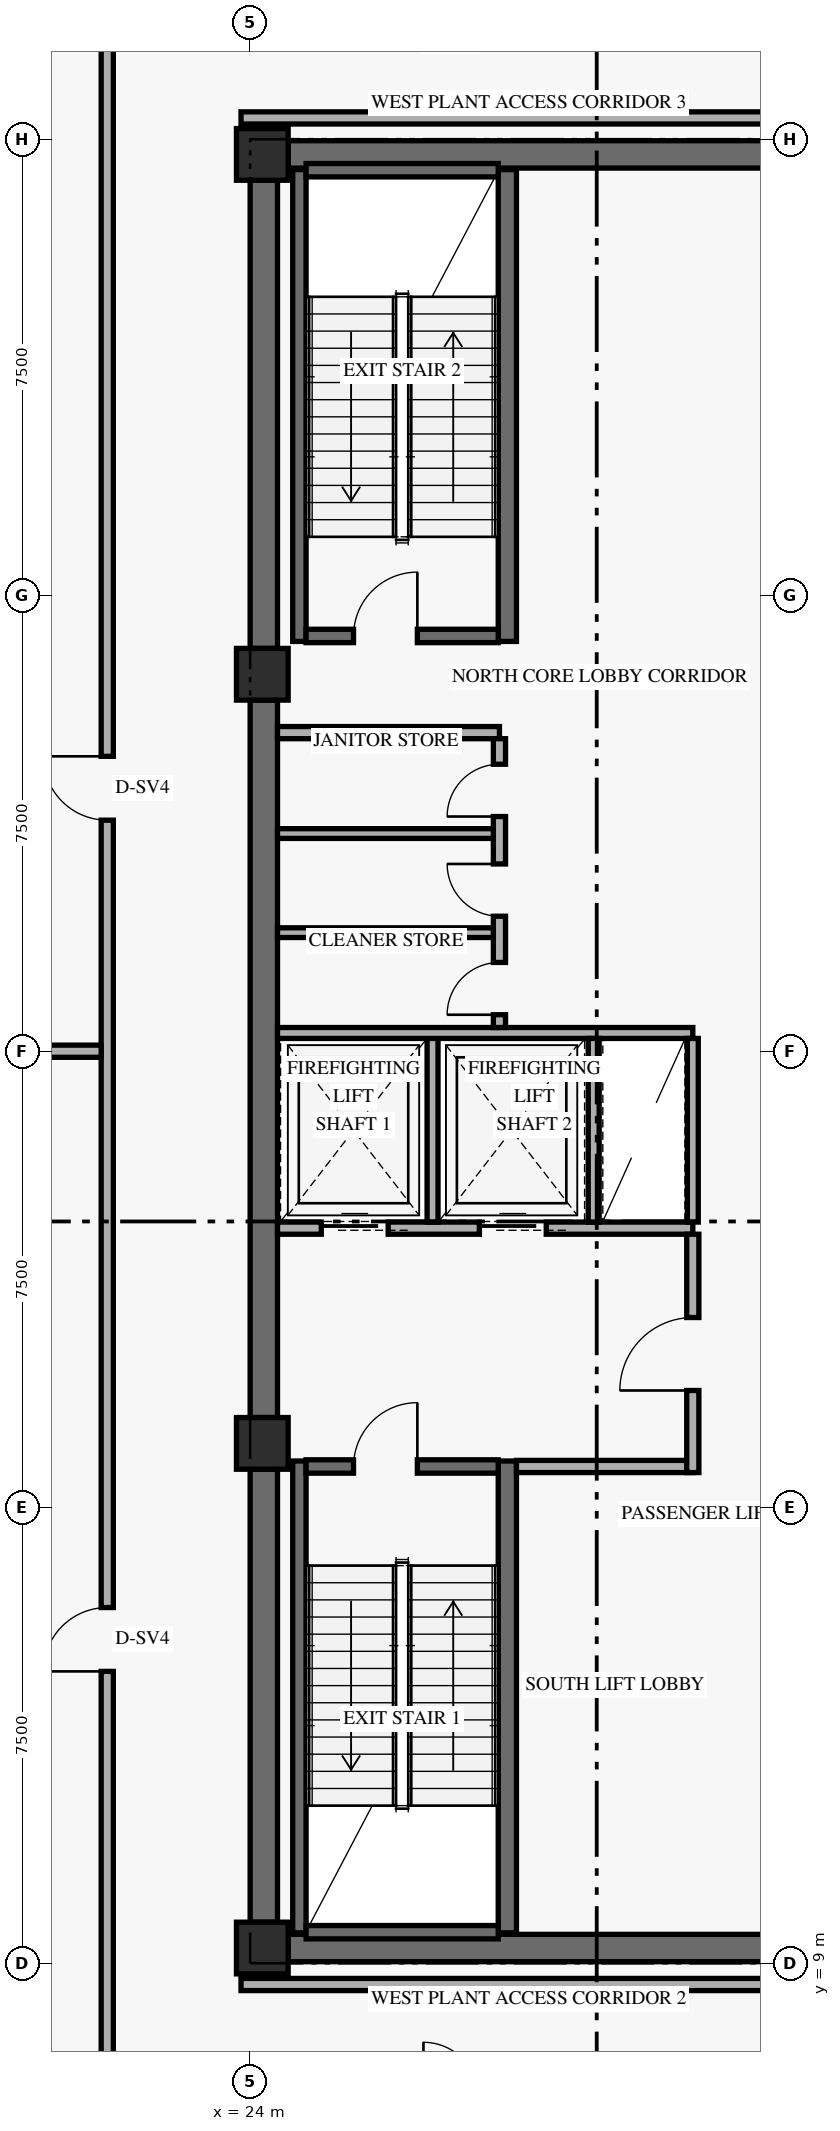
"""IFC4 building model, lengths in metres.
Left out: names, types, materials, properties, quantities, classifications, styles, units other than length and angle.
Written with IfcOpenShell. Run it as: python <this file> out.ifc"""

import sys

from ifc_helpers import new_model, si_unit, direction, frame, frame_2d, origin, origin_2d, place, context, subcontext, project, spatial, rectangle, extrude, element, fill, save


model = new_model("IFC4")
c1 = context("Model", 3, precision=1e-05, world=origin(), true_north=direction((0.0, 1.0)))
c2 = subcontext(c1, "Body", "Model", "MODEL_VIEW")
j1 = project(units=[si_unit("LENGTHUNIT", "METRE"), si_unit("PLANEANGLEUNIT", "RADIAN")], contexts=[c1])
p1 = place(None, origin())
s1 = spatial("IfcSite", under=j1, at=p1, CompositionType="ELEMENT")
p2 = place(p1, origin())
s2 = spatial("IfcBuilding", under=s1, at=p2, CompositionType="ELEMENT")
p3 = place(p2, frame((0.0, 0.0, 71.4)))
s3 = spatial("IfcBuildingStorey", under=s2, at=p3, CompositionType="ELEMENT", Elevation=71.4)
p4 = place(p3, frame((24.225, 9.675, 0.0), z_axis=(0.0, 0.0, 1.0), x_axis=(0.0, 1.0, 0.0)))
e1 = element("IfcWall", 1, at=p4, inside=s3, PredefinedType="SHEAR", context=c2, shape_type="SweptSolid", body=[
    extrude(rectangle(XDim=7.45, YDim=0.45, at=frame_2d((3.725, 0.0))), origin(), (0.0, 0.0, 1.0), 4.297),
])
p5 = place(p3, frame((24.225, 17.975, 0.0), z_axis=(0.0, 0.0, 1.0), x_axis=(0.0, 1.0, 0.0)))
e2 = element("IfcWall", 2, at=p5, inside=s3, PredefinedType="SHEAR", context=c2, shape_type="SweptSolid", body=[
    extrude(rectangle(XDim=11.8, YDim=0.45, at=frame_2d((5.9, 0.0))), origin(), (0.0, 0.0, 1.0), 4.297),
])
p6 = place(p3, frame((24.225, 30.625, 0.0), z_axis=(0.0, 0.0, 1.0), x_axis=(0.0, 1.0, 0.0)))
e3 = element("IfcWall", 3, at=p6, inside=s3, PredefinedType="SHEAR", context=c2, shape_type="SweptSolid", body=[
    extrude(rectangle(XDim=7.7, YDim=0.45, at=frame_2d((3.85, 0.0))), origin(), (0.0, 0.0, 1.0), 4.297),
])
for number, where, z_axis, x_axis in (
    (4, (24.625, 9.25, 0.0), (0.0, 0.0, 1.0), (1.0, 0.0, 0.0)),
    (5, (24.625, 38.75, 0.0), (0.0, 0.0, 1.0), (1.0, 0.0, 0.0)),
):
    element("IfcWall", number, at=place(p3, frame(where, z_axis=z_axis, x_axis=x_axis)), inside=s3, PredefinedType="SHEAR", context=c2, shape_type="SweptSolid", body=[
        extrude(rectangle(XDim=10.15, YDim=0.45, at=frame_2d((5.075, 0.0))), origin(), (0.0, 0.0, 1.0), 4.99),
    ])
p7 = place(p3, frame((24.81, 9.5, 0.0), z_axis=(0.0, 0.0, 1.0), x_axis=(0.0, 1.0, 0.0)))
e6 = element("IfcWall", 6, at=p7, inside=s3, PredefinedType="SHEAR", context=c2, shape_type="SweptSolid", body=[
    extrude(rectangle(XDim=7.76, YDim=0.22, at=frame_2d((3.88, 0.0))), origin(), (0.0, 0.0, 1.0), 4.99),
])
p8 = place(p3, frame((28.23, 9.5, 0.0), z_axis=(0.0, 0.0, 1.0), x_axis=(0.0, 1.0, 0.0)))
e7 = element("IfcWall", 7, at=p8, inside=s3, PredefinedType="SHEAR", context=c2, shape_type="SweptSolid", body=[
    extrude(rectangle(XDim=7.76, YDim=0.3, at=frame_2d((3.88, 0.0))), origin(), (0.0, 0.0, 1.0), 4.99),
])
p9 = place(p3, frame((24.92, 9.51, 0.0), z_axis=(0.0, 0.0, 1.0), x_axis=(1.0, 0.0, 0.0)))
e8 = element("IfcWall", 8, at=p9, inside=s3, PredefinedType="SHEAR", context=c2, shape_type="SweptSolid", body=[
    extrude(rectangle(XDim=3.16, YDim=0.22, at=frame_2d((1.58, 0.0))), origin(), (0.0, 0.0, 1.0), 4.99),
])
p10 = place(p3, frame((24.92, 17.17, 0.0), z_axis=(0.0, 0.0, 1.0), x_axis=(1.0, 0.0, 0.0)))
e9 = element("IfcWall", 9, at=p10, inside=s3, PredefinedType="SHEAR", context=c2, shape_type="SweptSolid", body=[
    extrude(rectangle(XDim=3.16, YDim=0.22, at=frame_2d((1.58, 0.0))), origin(), (0.0, 0.0, 1.0), 4.99),
])
p11 = place(p10, frame((0.78, 0.0, 0.0)))
e10 = element("IfcOpeningElement", 10, at=p11, cuts=e9, PredefinedType="OPENING", context=c2, shape_type="SweptSolid", body=[
    extrude(rectangle(XDim=1.05, YDim=2.15, at=frame_2d((0.525, 1.075))), frame((0.0, 0.12, 0.0), z_axis=(0.0, -1.0, 0.0), x_axis=(1.0, 0.0, 0.0)), (0.0, 0.0, 1.0), 0.24),
])
p12 = place(p3, frame((24.81, 30.74, 0.0), z_axis=(0.0, 0.0, 1.0), x_axis=(0.0, 1.0, 0.0)))
e11 = element("IfcWall", 11, at=p12, inside=s3, PredefinedType="SHEAR", context=c2, shape_type="SweptSolid", body=[
    extrude(rectangle(XDim=7.76, YDim=0.22, at=frame_2d((3.88, 0.0))), origin(), (0.0, 0.0, 1.0), 4.99),
])
p13 = place(p3, frame((28.23, 30.74, 0.0), z_axis=(0.0, 0.0, 1.0), x_axis=(0.0, 1.0, 0.0)))
e12 = element("IfcWall", 12, at=p13, inside=s3, PredefinedType="SHEAR", context=c2, shape_type="SweptSolid", body=[
    extrude(rectangle(XDim=7.76, YDim=0.3, at=frame_2d((3.88, 0.0))), origin(), (0.0, 0.0, 1.0), 4.99),
])
p14 = place(p3, frame((24.92, 30.83, 0.0), z_axis=(0.0, 0.0, 1.0), x_axis=(1.0, 0.0, 0.0)))
e13 = element("IfcWall", 13, at=p14, inside=s3, PredefinedType="SHEAR", context=c2, shape_type="SweptSolid", body=[
    extrude(rectangle(XDim=3.16, YDim=0.22, at=frame_2d((1.58, 0.0))), origin(), (0.0, 0.0, 1.0), 4.99),
])
p15 = place(p14, frame((0.78, 0.0, 0.0)))
e14 = element("IfcOpeningElement", 14, at=p15, cuts=e13, PredefinedType="OPENING", context=c2, shape_type="SweptSolid", body=[
    extrude(rectangle(XDim=1.05, YDim=2.15, at=frame_2d((0.525, 1.075))), frame((0.0, 0.12, 0.0), z_axis=(0.0, -1.0, 0.0), x_axis=(1.0, 0.0, 0.0)), (0.0, 0.0, 1.0), 0.24),
])
p16 = place(p3, frame((24.92, 38.49, 0.0), z_axis=(0.0, 0.0, 1.0), x_axis=(1.0, 0.0, 0.0)))
e15 = element("IfcWall", 15, at=p16, inside=s3, PredefinedType="SHEAR", context=c2, shape_type="SweptSolid", body=[
    extrude(rectangle(XDim=3.16, YDim=0.22, at=frame_2d((1.58, 0.0))), origin(), (0.0, 0.0, 1.0), 4.99),
])
for number, where, z_axis, x_axis in (
    (16, (24.2, 9.25, 0.0), (0.0, 0.0, 1.0), (1.0, 0.0, 0.0)),
    (17, (24.2, 17.55, 0.0), (0.0, 0.0, 1.0), (1.0, 0.0, 0.0)),
    (18, (24.2, 30.2, 0.0), (0.0, 0.0, 1.0), (1.0, 0.0, 0.0)),
    (19, (24.2, 38.75, 0.0), (0.0, 0.0, 1.0), (1.0, 0.0, 0.0)),
):
    element("IfcColumn", number, at=place(p3, frame(where, z_axis=z_axis, x_axis=x_axis)), inside=s3, PredefinedType="COLUMN", context=c2, shape_type="SweptSolid", body=[
        extrude(rectangle(XDim=0.85, YDim=0.85, at=origin_2d()), origin(), (0.0, 0.0, 1.0), 5.4),
    ])
p17 = place(p3, frame((24.45, 21.09, 0.0), z_axis=(0.0, 0.0, 1.0), x_axis=(1.0, 0.0, 0.0)))
e20 = element("IfcWall", 20, at=p17, inside=s3, PredefinedType="STANDARD", context=c2, shape_type="SweptSolid", body=[
    extrude(rectangle(XDim=6.83, YDim=0.2, at=frame_2d((3.415, 0.0))), origin(), (0.0, 0.0, 1.0), 4.99),
])
p18 = place(p17, frame((0.72, 0.0, 0.0)))
e21 = element("IfcOpeningElement", 21, at=p18, cuts=e20, PredefinedType="OPENING", context=c2, shape_type="SweptSolid", body=[
    extrude(rectangle(XDim=1.1, YDim=2.2, at=frame_2d((0.55, 1.1))), frame((0.0, 0.11, 0.0), z_axis=(0.0, -1.0, 0.0), x_axis=(1.0, 0.0, 0.0)), (0.0, 0.0, 1.0), 0.22),
])
p19 = place(p17, frame((3.32, 0.0, 0.0)))
e22 = element("IfcOpeningElement", 22, at=p19, cuts=e20, PredefinedType="OPENING", context=c2, shape_type="SweptSolid", body=[
    extrude(rectangle(XDim=1.1, YDim=2.2, at=frame_2d((0.55, 1.1))), frame((0.0, 0.11, 0.0), z_axis=(0.0, -1.0, 0.0), x_axis=(1.0, 0.0, 0.0)), (0.0, 0.0, 1.0), 0.22),
])
p20 = place(p3, frame((28.38, 17.17, 0.0), z_axis=(0.0, 0.0, 1.0), x_axis=(1.0, 0.0, 0.0)))
e23 = element("IfcWall", 23, at=p20, inside=s3, PredefinedType="STANDARD", context=c2, shape_type="SweptSolid", body=[
    extrude(rectangle(XDim=2.9, YDim=0.2, at=frame_2d((1.45, 0.0))), origin(), (0.0, 0.0, 1.0), 4.99),
])
p21 = place(p3, frame((31.28, 17.07, 0.0), z_axis=(0.0, 0.0, 1.0), x_axis=(0.0, 1.0, 0.0)))
e24 = element("IfcWall", 24, at=p21, inside=s3, PredefinedType="STANDARD", context=c2, shape_type="SweptSolid", body=[
    extrude(rectangle(XDim=3.92, YDim=0.2, at=frame_2d((1.96, 0.0))), origin(), (0.0, 0.0, 1.0), 4.279),
])
p22 = place(p21, frame((1.35, 0.0, 0.0)))
e25 = element("IfcOpeningElement", 25, at=p22, cuts=e24, PredefinedType="OPENING", context=c2, shape_type="SweptSolid", body=[
    extrude(rectangle(XDim=1.2, YDim=2.15, at=frame_2d((0.6, 1.075))), frame((0.0, 0.11, 0.0), z_axis=(0.0, -1.0, 0.0), x_axis=(1.0, 0.0, 0.0)), (0.0, 0.0, 1.0), 0.22),
])
p23 = place(p3, frame((27.0, 21.19, 0.0), z_axis=(0.0, 0.0, 1.0), x_axis=(0.0, 1.0, 0.0)))
e26 = element("IfcWall", 26, at=p23, inside=s3, PredefinedType="STANDARD", context=c2, shape_type="SweptSolid", body=[
    extrude(rectangle(XDim=3.11, YDim=0.18, at=frame_2d((1.555, 0.0))), origin(), (0.0, 0.0, 1.0), 4.99),
])
p24 = place(p3, frame((24.45, 24.3, 0.0), z_axis=(0.0, 0.0, 1.0), x_axis=(1.0, 0.0, 0.0)))
e27 = element("IfcWall", 27, at=p24, inside=s3, PredefinedType="STANDARD", context=c2, shape_type="SweptSolid", body=[
    extrude(rectangle(XDim=6.83, YDim=0.18, at=frame_2d((3.415, 0.0))), origin(), (0.0, 0.0, 1.0), 4.99),
])
for number, where, z_axis, x_axis in (
    (28, (29.65, 21.19, 0.0), (0.0, 0.0, 1.0), (0.0, 1.0, 0.0)),
    (29, (31.28, 21.19, 0.0), (0.0, 0.0, 1.0), (0.0, 1.0, 0.0)),
):
    element("IfcWall", number, at=place(p3, frame(where, z_axis=z_axis, x_axis=x_axis)), inside=s3, PredefinedType="STANDARD", context=c2, shape_type="SweptSolid", body=[
        extrude(rectangle(XDim=3.02, YDim=0.18, at=frame_2d((1.51, 0.0))), origin(), (0.0, 0.0, 1.0), 4.99),
    ])
p25 = place(p3, frame((24.45, 29.24, 0.0), z_axis=(0.0, 0.0, 1.0), x_axis=(1.0, 0.0, 0.0)))
e30 = element("IfcWall", 30, at=p25, inside=s3, PredefinedType="STANDARD", context=c2, shape_type="SweptSolid", body=[
    extrude(rectangle(XDim=3.65, YDim=0.2, at=frame_2d((1.825, 0.0))), origin(), (0.0, 0.0, 1.0), 4.99),
])
p26 = place(p3, frame((28.1, 24.39, 0.0), z_axis=(0.0, 0.0, 1.0), x_axis=(0.0, 1.0, 0.0)))
e31 = element("IfcWall", 31, at=p26, inside=s3, PredefinedType="STANDARD", context=c2, shape_type="SweptSolid", body=[
    extrude(rectangle(XDim=4.75, YDim=0.2, at=frame_2d((2.375, 0.0))), origin(), (0.0, 0.0, 1.0), 4.99),
])
p27 = place(p26, frame((0.21, 0.0, 0.0)))
e32 = element("IfcOpeningElement", 32, at=p27, cuts=e31, PredefinedType="OPENING", context=c2, shape_type="SweptSolid", body=[
    extrude(rectangle(XDim=0.86, YDim=2.1, at=frame_2d((0.43, 1.05))), frame((0.0, 0.11, 0.0), z_axis=(0.0, -1.0, 0.0), x_axis=(1.0, 0.0, 0.0)), (0.0, 0.0, 1.0), 0.22),
])
p28 = place(p26, frame((1.83, 0.0, 0.0)))
e33 = element("IfcOpeningElement", 33, at=p28, cuts=e31, PredefinedType="OPENING", context=c2, shape_type="SweptSolid", body=[
    extrude(rectangle(XDim=0.86, YDim=2.1, at=frame_2d((0.43, 1.05))), frame((0.0, 0.11, 0.0), z_axis=(0.0, -1.0, 0.0), x_axis=(1.0, 0.0, 0.0)), (0.0, 0.0, 1.0), 0.22),
])
p29 = place(p26, frame((3.47, 0.0, 0.0)))
e34 = element("IfcOpeningElement", 34, at=p29, cuts=e31, PredefinedType="OPENING", context=c2, shape_type="SweptSolid", body=[
    extrude(rectangle(XDim=0.86, YDim=2.1, at=frame_2d((0.43, 1.05))), frame((0.0, 0.11, 0.0), z_axis=(0.0, -1.0, 0.0), x_axis=(1.0, 0.0, 0.0)), (0.0, 0.0, 1.0), 0.22),
])
for number, where, z_axis, x_axis in (
    (35, (24.45, 25.95, 0.0), (0.0, 0.0, 1.0), (1.0, 0.0, 0.0)),
    (36, (24.45, 27.58, 0.0), (0.0, 0.0, 1.0), (1.0, 0.0, 0.0)),
):
    element("IfcWall", number, at=place(p3, frame(where, z_axis=z_axis, x_axis=x_axis)), inside=s3, PredefinedType="PARTITIONING", context=c2, shape_type="SweptSolid", body=[
        extrude(rectangle(XDim=3.55, YDim=0.16, at=frame_2d((1.775, 0.0))), origin(), (0.0, 0.0, 1.0), 4.99),
    ])
p30 = place(p3, frame((21.65, 6.8, 0.0), z_axis=(0.0, 0.0, 1.0), x_axis=(0.0, 1.0, 0.0)))
e37 = element("IfcWall", 37, at=p30, inside=s3, PredefinedType="STANDARD", context=c2, shape_type="SweptSolid", body=[
    extrude(rectangle(XDim=34.4, YDim=0.2, at=frame_2d((17.2, 0.0))), origin(), (0.0, 0.0, 1.0), 4.279),
])
p31 = place(p30, frame((7.0, 0.0, 0.0)))
e38 = element("IfcOpeningElement", 38, at=p31, cuts=e37, PredefinedType="OPENING", context=c2, shape_type="SweptSolid", body=[
    extrude(rectangle(XDim=1.05, YDim=2.15, at=frame_2d((0.525, 1.075))), frame((0.0, 0.11, 0.0), z_axis=(0.0, -1.0, 0.0), x_axis=(1.0, 0.0, 0.0)), (0.0, 0.0, 1.0), 0.22),
])
p32 = place(p30, frame((21.0, 0.0, 0.0)))
e39 = element("IfcOpeningElement", 39, at=p32, cuts=e37, PredefinedType="OPENING", context=c2, shape_type="SweptSolid", body=[
    extrude(rectangle(XDim=1.05, YDim=2.15, at=frame_2d((0.525, 1.075))), frame((0.0, 0.11, 0.0), z_axis=(0.0, -1.0, 0.0), x_axis=(1.0, 0.0, 0.0)), (0.0, 0.0, 1.0), 0.22),
])
for number, where, z_axis, x_axis in (
    (40, (23.85, 39.35, 0.0), (0.0, 0.0, 1.0), (1.0, 0.0, 0.0)),
    (41, (23.85, 8.65, 0.0), (0.0, 0.0, 1.0), (1.0, 0.0, 0.0)),
):
    element("IfcWall", number, at=place(p3, frame(where, z_axis=z_axis, x_axis=x_axis)), inside=s3, PredefinedType="STANDARD", context=c2, shape_type="SweptSolid", body=[
        extrude(rectangle(XDim=11.47, YDim=0.2, at=frame_2d((5.735, 0.0))), origin(), (0.0, 0.0, 1.0), 4.279),
    ])
p33 = place(p3, frame((2.11, 24.0, 0.0), z_axis=(0.0, 0.0, 1.0), x_axis=(1.0, 0.0, 0.0)))
e42 = element("IfcWall", 42, at=p33, inside=s3, PredefinedType="STANDARD", context=c2, shape_type="SweptSolid", body=[
    extrude(rectangle(XDim=19.44, YDim=0.2, at=frame_2d((9.72, 0.0))), origin(), (0.0, 0.0, 1.0), 4.279),
])
p34 = place(p11, frame((1.05, 0.0, 0.0), z_axis=(0.0, 0.0, 1.0), x_axis=(-1.0, 0.0, 0.0)))
e43 = element("IfcDoor", 43, at=p34, inside=s3, OperationType="SINGLE_SWING_LEFT", PredefinedType="DOOR", context=c2, shape_type="SweptSolid", body=[
    extrude(rectangle(XDim=1.05, YDim=2.15, at=frame_2d((0.525, 1.075))), frame((0.0, 0.025, 0.0), z_axis=(0.0, -1.0, 0.0), x_axis=(1.0, 0.0, 0.0)), (0.0, 0.0, 1.0), 0.05),
])
fill(e10, e43)
p35 = place(p15, origin())
e44 = element("IfcDoor", 44, at=p35, inside=s3, OperationType="SINGLE_SWING_RIGHT", PredefinedType="DOOR", context=c2, shape_type="SweptSolid", body=[
    extrude(rectangle(XDim=1.05, YDim=2.15, at=frame_2d((0.525, 1.075))), frame((0.0, 0.025, 0.0), z_axis=(0.0, -1.0, 0.0), x_axis=(1.0, 0.0, 0.0)), (0.0, 0.0, 1.0), 0.05),
])
fill(e14, e44)
p36 = place(p18, origin())
e45 = element("IfcDoor", 45, at=p36, inside=s3, OperationType="SLIDING_TO_LEFT", PredefinedType="DOOR", context=c2, shape_type="SweptSolid", body=[
    extrude(rectangle(XDim=1.1, YDim=2.2, at=frame_2d((0.55, 1.1))), frame((0.0, 0.025, 0.0), z_axis=(0.0, -1.0, 0.0), x_axis=(1.0, 0.0, 0.0)), (0.0, 0.0, 1.0), 0.05),
])
fill(e21, e45)
p37 = place(p19, origin())
e46 = element("IfcDoor", 46, at=p37, inside=s3, OperationType="SLIDING_TO_LEFT", PredefinedType="DOOR", context=c2, shape_type="SweptSolid", body=[
    extrude(rectangle(XDim=1.1, YDim=2.2, at=frame_2d((0.55, 1.1))), frame((0.0, 0.025, 0.0), z_axis=(0.0, -1.0, 0.0), x_axis=(1.0, 0.0, 0.0)), (0.0, 0.0, 1.0), 0.05),
])
fill(e22, e46)
p38 = place(p22, origin())
e47 = element("IfcDoor", 47, at=p38, inside=s3, OperationType="SINGLE_SWING_LEFT", PredefinedType="DOOR", context=c2, shape_type="SweptSolid", body=[
    extrude(rectangle(XDim=1.2, YDim=2.15, at=frame_2d((0.6, 1.075))), frame((0.0, 0.025, 0.0), z_axis=(0.0, -1.0, 0.0), x_axis=(1.0, 0.0, 0.0)), (0.0, 0.0, 1.0), 0.05),
])
fill(e25, e47)
p39 = place(p27, origin())
e48 = element("IfcDoor", 48, at=p39, inside=s3, OperationType="SINGLE_SWING_LEFT", PredefinedType="DOOR", context=c2, shape_type="SweptSolid", body=[
    extrude(rectangle(XDim=0.86, YDim=2.1, at=frame_2d((0.43, 1.05))), frame((0.0, 0.025, 0.0), z_axis=(0.0, -1.0, 0.0), x_axis=(1.0, 0.0, 0.0)), (0.0, 0.0, 1.0), 0.05),
])
fill(e32, e48)
p40 = place(p28, origin())
e49 = element("IfcDoor", 49, at=p40, inside=s3, OperationType="SINGLE_SWING_RIGHT", PredefinedType="DOOR", context=c2, shape_type="SweptSolid", body=[
    extrude(rectangle(XDim=0.86, YDim=2.1, at=frame_2d((0.43, 1.05))), frame((0.0, 0.025, 0.0), z_axis=(0.0, -1.0, 0.0), x_axis=(1.0, 0.0, 0.0)), (0.0, 0.0, 1.0), 0.05),
])
fill(e33, e49)
p41 = place(p29, origin())
e50 = element("IfcDoor", 50, at=p41, inside=s3, OperationType="SINGLE_SWING_LEFT", PredefinedType="DOOR", context=c2, shape_type="SweptSolid", body=[
    extrude(rectangle(XDim=0.86, YDim=2.1, at=frame_2d((0.43, 1.05))), frame((0.0, 0.025, 0.0), z_axis=(0.0, -1.0, 0.0), x_axis=(1.0, 0.0, 0.0)), (0.0, 0.0, 1.0), 0.05),
])
fill(e34, e50)
p42 = place(p31, origin())
e51 = element("IfcDoor", 51, at=p42, inside=s3, OperationType="SINGLE_SWING_LEFT", PredefinedType="DOOR", context=c2, shape_type="SweptSolid", body=[
    extrude(rectangle(XDim=1.05, YDim=2.15, at=frame_2d((0.525, 1.075))), frame((0.0, 0.025, 0.0), z_axis=(0.0, -1.0, 0.0), x_axis=(1.0, 0.0, 0.0)), (0.0, 0.0, 1.0), 0.05),
])
fill(e38, e51)
p43 = place(p32, origin())
e52 = element("IfcDoor", 52, at=p43, inside=s3, OperationType="SINGLE_SWING_RIGHT", PredefinedType="DOOR", context=c2, shape_type="SweptSolid", body=[
    extrude(rectangle(XDim=1.05, YDim=2.15, at=frame_2d((0.525, 1.075))), frame((0.0, 0.025, 0.0), z_axis=(0.0, -1.0, 0.0), x_axis=(1.0, 0.0, 0.0)), (0.0, 0.0, 1.0), 0.05),
])
fill(e39, e52)
save(model, sys.argv[1])
